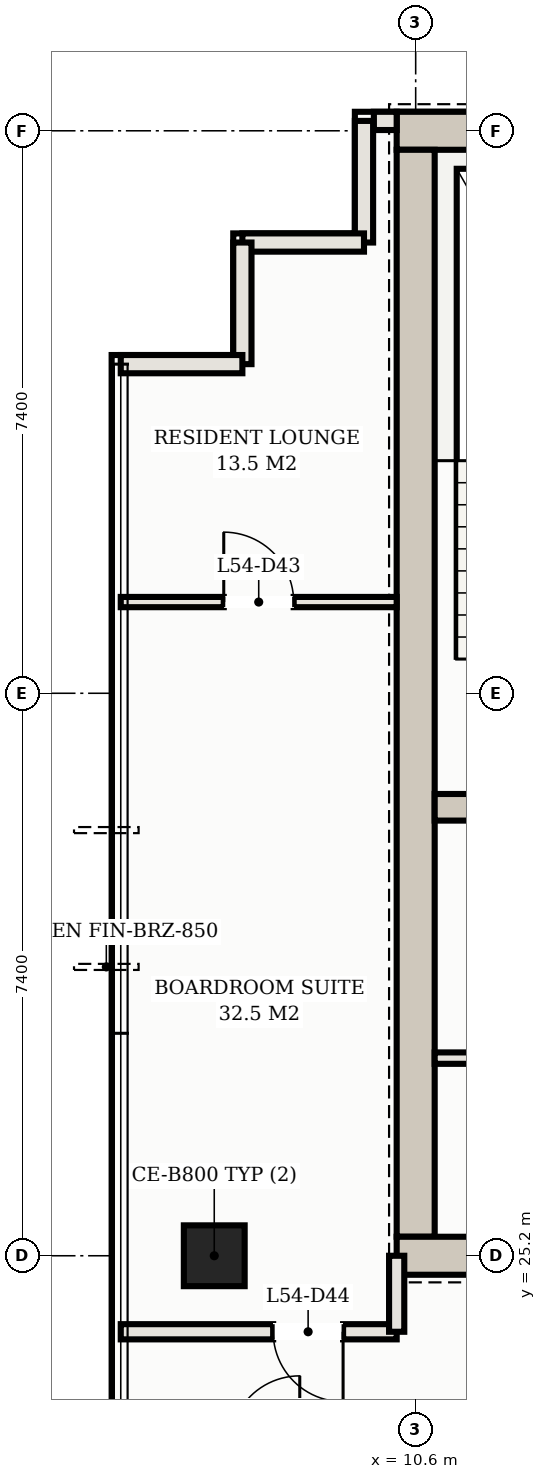
"""IFC4 building model, lengths in metres.
Left out: names, types, materials, properties, quantities, classifications, styles, units other than length and angle.
Written with IfcOpenShell. Run it as: python <this file> out.ifc"""

import sys

from ifc_helpers import new_model, si_unit, direction, frame, frame_2d, origin, origin_2d, place, context, subcontext, project, spatial, rectangle, hollow_rectangle, extrude, element, fill, save


model = new_model("IFC4")
c1 = context("Model", 3, precision=1e-05, world=origin(), true_north=direction((0.0, 1.0)))
c2 = subcontext(c1, "Body", "Model", "MODEL_VIEW")
j1 = project(units=[si_unit("LENGTHUNIT", "METRE"), si_unit("PLANEANGLEUNIT", "RADIAN")], contexts=[c1])
p1 = place(None, origin())
s1 = spatial("IfcSite", under=j1, at=p1, CompositionType="ELEMENT")
p2 = place(p1, origin())
s2 = spatial("IfcBuilding", under=s1, at=p2, CompositionType="ELEMENT")
p3 = place(p2, frame((0.0, 0.0, 200.0)))
s3 = spatial("IfcBuildingStorey", under=s2, at=p3, CompositionType="ELEMENT", Elevation=200.0)
p4 = place(p3, frame((10.35, 40.0, 0.0), z_axis=(0.0, 0.0, 1.0), x_axis=(1.0, 0.0, 0.0)))
e1 = element("IfcWall", 1, at=p4, inside=s3, PredefinedType="SHEAR", context=c2, shape_type="SweptSolid", body=[
    extrude(rectangle(XDim=32.3, YDim=0.5, at=frame_2d((16.15, 0.0))), origin(), (0.0, 0.0, 1.0), 3.11),
])
p5 = place(p3, frame((10.6, 25.45, 0.0), z_axis=(0.0, 0.0, 1.0), x_axis=(0.0, 1.0, 0.0)))
e2 = element("IfcWall", 2, at=p5, inside=s3, PredefinedType="SHEAR", context=c2, shape_type="SweptSolid", body=[
    extrude(rectangle(XDim=14.3, YDim=0.5, at=frame_2d((7.15, 0.0))), origin(), (0.0, 0.0, 1.0), 3.11),
])
p6 = place(p3, frame((10.35, 25.2, 0.0), z_axis=(0.0, 0.0, 1.0), x_axis=(1.0, 0.0, 0.0)))
e3 = element("IfcWall", 3, at=p6, inside=s3, PredefinedType="SHEAR", context=c2, shape_type="SweptSolid", body=[
    extrude(rectangle(XDim=8.05, YDim=0.5, at=frame_2d((4.025, 0.0))), origin(), (0.0, 0.0, 1.0), 3.11),
])
p7 = place(p6, frame((6.15, 0.0, 0.0)))
e4 = element("IfcOpeningElement", 4, at=p7, cuts=e3, PredefinedType="OPENING", context=c2, shape_type="SweptSolid", body=[
    extrude(rectangle(XDim=1.25, YDim=2.2, at=frame_2d((0.625, 1.1))), frame((0.0, 0.26, 0.0), z_axis=(0.0, -1.0, 0.0), x_axis=(1.0, 0.0, 0.0)), (0.0, 0.0, 1.0), 0.52),
])
p8 = place(p3, frame((10.85, 31.1, 0.0), z_axis=(0.0, 0.0, 1.0), x_axis=(1.0, 0.0, 0.0)))
e5 = element("IfcWall", 5, at=p8, inside=s3, PredefinedType="SHEAR", context=c2, shape_type="SweptSolid", body=[
    extrude(rectangle(XDim=4.075, YDim=0.35, at=frame_2d((2.038, 0.0))), origin(), (0.0, 0.0, 1.0), 3.11),
])
p9 = place(p3, frame((7.95, 25.2, 0.0), z_axis=(0.0, 0.0, 1.0), x_axis=(1.0, 0.0, 0.0)))
e6 = element("IfcColumn", 6, at=p9, inside=s3, PredefinedType="COLUMN", context=c2, shape_type="SweptSolid", body=[
    extrude(hollow_rectangle(XDim=0.8, YDim=0.8, WallThickness=0.028, at=origin_2d()), origin(), (0.0, 0.0, 1.0), 3.3),
])
p10 = place(p3, frame((10.35, 40.13, 0.0), z_axis=(0.0, 0.0, 1.0), x_axis=(-1.0, 0.0, 0.0)))
e7 = element("IfcWall", 7, at=p10, inside=s3, PredefinedType="SOLIDWALL", context=c2, shape_type="SweptSolid", body=[
    extrude(rectangle(XDim=0.3, YDim=0.24, at=frame_2d((0.15, 0.0))), origin(), (0.0, 0.0, 1.0), 3.11),
])
for number, where, z_axis, x_axis in (
    (8, (9.92, 40.13, 0.0), (0.0, 0.0, 1.0), (0.0, -1.0, 0.0)),
    (9, (9.92, 38.53, 0.0), (0.0, 0.0, 1.0), (-1.0, 0.0, 0.0)),
):
    element("IfcWall", number, at=place(p3, frame(where, z_axis=z_axis, x_axis=x_axis)), inside=s3, PredefinedType="SOLIDWALL", context=c2, shape_type="SweptSolid", body=[
        extrude(rectangle(XDim=1.6, YDim=0.24, at=frame_2d((0.8, 0.0))), origin(), (0.0, 0.0, 1.0), 3.11),
    ])
for number, where, z_axis, x_axis in (
    (10, (8.32, 38.53, 0.0), (0.0, 0.0, 1.0), (0.0, -1.0, 0.0)),
    (11, (8.32, 36.93, 0.0), (0.0, 0.0, 1.0), (-1.0, 0.0, 0.0)),
):
    element("IfcWall", number, at=place(p3, frame(where, z_axis=z_axis, x_axis=x_axis)), inside=s3, PredefinedType="SOLIDWALL", context=c2, shape_type="SweptSolid", body=[
        extrude(rectangle(XDim=1.6, YDim=0.24, at=frame_2d((0.8, 0.0))), origin(), (0.0, 0.0, 1.0), 3.11),
    ])
p11 = place(p3, frame((10.85, 27.8, 0.0), z_axis=(0.0, 0.0, 1.0), x_axis=(1.0, 0.0, 0.0)))
e12 = element("IfcWall", 12, at=p11, inside=s3, PredefinedType="PARTITIONING", context=c2, shape_type="SweptSolid", body=[
    extrude(rectangle(XDim=5.0, YDim=0.15, at=frame_2d((2.5, 0.0))), origin(), (0.0, 0.0, 1.0), 2.43),
])
p12 = place(p3, frame((6.72, 24.2, 0.0), z_axis=(0.0, 0.0, 1.0), x_axis=(1.0, 0.0, 0.0)))
e13 = element("IfcWall", 13, at=p12, inside=s3, PredefinedType="PARTITIONING", context=c2, shape_type="SweptSolid", body=[
    extrude(rectangle(XDim=3.63, YDim=0.2, at=frame_2d((1.815, 0.0))), origin(), (0.0, 0.0, 1.0), 2.43),
])
p13 = place(p12, frame((2.005, 0.0, 0.0)))
e14 = element("IfcOpeningElement", 14, at=p13, cuts=e13, PredefinedType="OPENING", context=c2, shape_type="SweptSolid", body=[
    extrude(rectangle(XDim=0.92, YDim=2.15, at=frame_2d((0.46, 1.075))), frame((0.0, 0.11, 0.0), z_axis=(0.0, -1.0, 0.0), x_axis=(1.0, 0.0, 0.0)), (0.0, 0.0, 1.0), 0.22),
])
p14 = place(p3, frame((10.35, 24.2, 0.0), z_axis=(0.0, 0.0, 1.0), x_axis=(0.0, 1.0, 0.0)))
e15 = element("IfcWall", 15, at=p14, inside=s3, PredefinedType="PARTITIONING", context=c2, shape_type="SweptSolid", body=[
    extrude(rectangle(XDim=1.0, YDim=0.2, at=frame_2d((0.5, 0.0))), origin(), (0.0, 0.0, 1.0), 2.43),
])
p15 = place(p3, frame((6.72, 33.8, 0.0), z_axis=(0.0, 0.0, 1.0), x_axis=(1.0, 0.0, 0.0)))
e16 = element("IfcWall", 16, at=p15, inside=s3, PredefinedType="PARTITIONING", context=c2, shape_type="SweptSolid", body=[
    extrude(rectangle(XDim=3.63, YDim=0.135, at=frame_2d((1.815, 0.0))), origin(), (0.0, 0.0, 1.0), 2.43),
])
p16 = place(p15, frame((1.355, 0.0, 0.0)))
e17 = element("IfcOpeningElement", 17, at=p16, cuts=e16, PredefinedType="OPENING", context=c2, shape_type="SweptSolid", body=[
    extrude(rectangle(XDim=0.92, YDim=2.15, at=frame_2d((0.46, 1.075))), frame((0.0, 0.078, 0.0), z_axis=(0.0, -1.0, 0.0), x_axis=(1.0, 0.0, 0.0)), (0.0, 0.0, 1.0), 0.155),
])
p17 = place(p16, origin())
e18 = element("IfcDoor", 18, at=p17, inside=s3, OperationType="SINGLE_SWING_LEFT", PredefinedType="DOOR", context=c2, shape_type="SweptSolid", body=[
    extrude(rectangle(XDim=0.92, YDim=2.15, at=frame_2d((0.46, 1.075))), frame((0.0, 0.025, 0.0), z_axis=(0.0, -1.0, 0.0), x_axis=(1.0, 0.0, 0.0)), (0.0, 0.0, 1.0), 0.05),
])
fill(e17, e18)
p18 = place(p13, frame((0.92, 0.0, 0.0), z_axis=(0.0, 0.0, 1.0), x_axis=(-1.0, 0.0, 0.0)))
e19 = element("IfcDoor", 19, at=p18, inside=s3, OperationType="SINGLE_SWING_LEFT", PredefinedType="DOOR", context=c2, shape_type="SweptSolid", body=[
    extrude(rectangle(XDim=0.92, YDim=2.15, at=frame_2d((0.46, 1.075))), frame((0.0, 0.025, 0.0), z_axis=(0.0, -1.0, 0.0), x_axis=(1.0, 0.0, 0.0)), (0.0, 0.0, 1.0), 0.05),
])
fill(e14, e19)
save(model, sys.argv[1])
